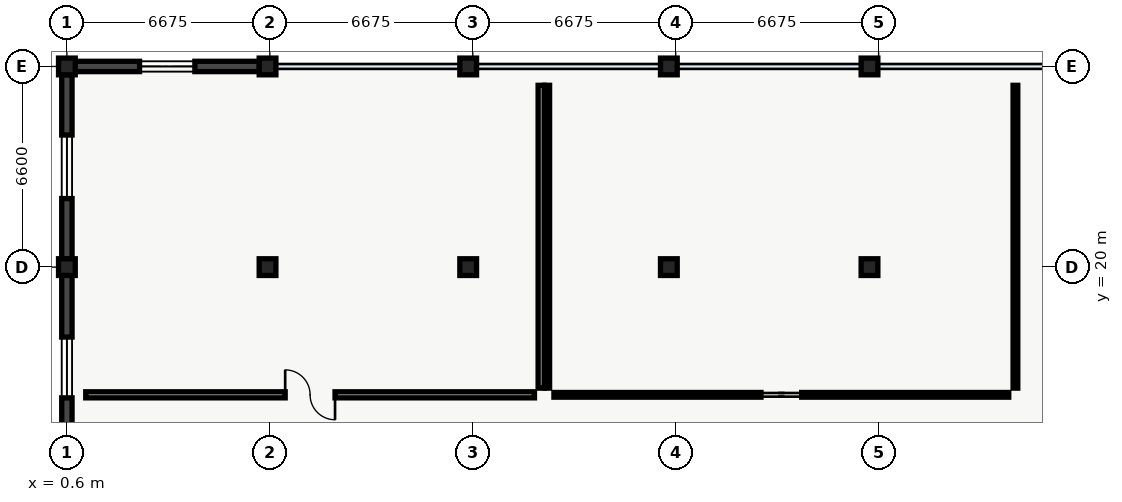
"""IFC4 building model, lengths in metres.
Left out: names, types, materials, properties, quantities, classifications, styles, units other than length and angle.
Written with IfcOpenShell. Run it as: python <this file> out.ifc"""

import sys

from ifc_helpers import new_model, si_unit, direction, frame, frame_2d, origin, origin_2d, place, context, subcontext, project, spatial, polyline, rectangle, outline, extrude, element, fill, save


model = new_model("IFC4")
c1 = context("Model", 3, precision=1e-05, world=origin(), true_north=direction((0.0, 1.0)))
c2 = subcontext(c1, "Body", "Model", "MODEL_VIEW")
j1 = project(units=[si_unit("LENGTHUNIT", "METRE"), si_unit("PLANEANGLEUNIT", "RADIAN")], contexts=[c1])
p1 = place(None, origin())
s1 = spatial("IfcSite", under=j1, at=p1, CompositionType="ELEMENT")
p2 = place(p1, origin())
s2 = spatial("IfcBuilding", under=s1, at=p2, CompositionType="ELEMENT")
p3 = place(p2, frame((0.0, 0.0, 18.6)))
s3 = spatial("IfcBuildingStorey", under=s2, at=p3, CompositionType="ELEMENT", Elevation=18.6)
p4 = place(p3, frame((0.6, 20.0, 0.0), z_axis=(0.0, 0.0, 1.0), x_axis=(1.0, 0.0, 0.0)))
e1 = element("IfcColumn", 1, at=p4, inside=s3, PredefinedType="COLUMN", context=c2, shape_type="SweptSolid", body=[
    extrude(rectangle(XDim=0.55, YDim=0.55, at=origin_2d()), origin(), (0.0, 0.0, 1.0), 9.105),
])
p5 = place(p3, frame((0.6, 26.6, 0.0), z_axis=(0.0, 0.0, 1.0), x_axis=(1.0, 0.0, 0.0)))
e2 = element("IfcColumn", 2, at=p5, inside=s3, PredefinedType="COLUMN", context=c2, shape_type="SweptSolid", body=[
    extrude(rectangle(XDim=0.55, YDim=0.55, at=origin_2d()), origin(), (0.0, 0.0, 1.0), 10.705),
])
p6 = place(p3, frame((7.2, 20.0, 0.0), z_axis=(0.0, 0.0, 1.0), x_axis=(1.0, 0.0, 0.0)))
e3 = element("IfcColumn", 3, at=p6, inside=s3, PredefinedType="COLUMN", context=c2, shape_type="SweptSolid", body=[
    extrude(rectangle(XDim=0.55, YDim=0.55, at=origin_2d()), origin(), (0.0, 0.0, 1.0), 9.105),
])
p7 = place(p3, frame((7.2, 26.6, 0.0), z_axis=(0.0, 0.0, 1.0), x_axis=(1.0, 0.0, 0.0)))
e4 = element("IfcColumn", 4, at=p7, inside=s3, PredefinedType="COLUMN", context=c2, shape_type="SweptSolid", body=[
    extrude(rectangle(XDim=0.55, YDim=0.55, at=origin_2d()), origin(), (0.0, 0.0, 1.0), 10.705),
])
p8 = place(p3, frame((13.8, 20.0, 0.0), z_axis=(0.0, 0.0, 1.0), x_axis=(1.0, 0.0, 0.0)))
e5 = element("IfcColumn", 5, at=p8, inside=s3, PredefinedType="COLUMN", context=c2, shape_type="SweptSolid", body=[
    extrude(rectangle(XDim=0.55, YDim=0.55, at=origin_2d()), origin(), (0.0, 0.0, 1.0), 9.105),
])
p9 = place(p3, frame((13.8, 26.6, 0.0), z_axis=(0.0, 0.0, 1.0), x_axis=(1.0, 0.0, 0.0)))
e6 = element("IfcColumn", 6, at=p9, inside=s3, PredefinedType="COLUMN", context=c2, shape_type="SweptSolid", body=[
    extrude(rectangle(XDim=0.55, YDim=0.55, at=origin_2d()), origin(), (0.0, 0.0, 1.0), 10.705),
])
p10 = place(p3, frame((20.4, 20.0, 0.0), z_axis=(0.0, 0.0, 1.0), x_axis=(1.0, 0.0, 0.0)))
e7 = element("IfcColumn", 7, at=p10, inside=s3, PredefinedType="COLUMN", context=c2, shape_type="SweptSolid", body=[
    extrude(rectangle(XDim=0.55, YDim=0.55, at=origin_2d()), origin(), (0.0, 0.0, 1.0), 9.105),
])
p11 = place(p3, frame((20.4, 26.6, 0.0), z_axis=(0.0, 0.0, 1.0), x_axis=(1.0, 0.0, 0.0)))
e8 = element("IfcColumn", 8, at=p11, inside=s3, PredefinedType="COLUMN", context=c2, shape_type="SweptSolid", body=[
    extrude(rectangle(XDim=0.55, YDim=0.55, at=origin_2d()), origin(), (0.0, 0.0, 1.0), 10.705),
])
p12 = place(p3, frame((27.0, 20.0, 0.0), z_axis=(0.0, 0.0, 1.0), x_axis=(1.0, 0.0, 0.0)))
e9 = element("IfcColumn", 9, at=p12, inside=s3, PredefinedType="COLUMN", context=c2, shape_type="SweptSolid", body=[
    extrude(rectangle(XDim=0.55, YDim=0.55, at=origin_2d()), origin(), (0.0, 0.0, 1.0), 9.105),
])
p13 = place(p3, frame((27.0, 26.6, 0.0), z_axis=(0.0, 0.0, 1.0), x_axis=(1.0, 0.0, 0.0)))
e10 = element("IfcColumn", 10, at=p13, inside=s3, PredefinedType="COLUMN", context=c2, shape_type="SweptSolid", body=[
    extrude(rectangle(XDim=0.55, YDim=0.55, at=origin_2d()), origin(), (0.0, 0.0, 1.0), 10.705),
])
p14 = place(p3, frame((0.6, 13.67, 0.0), z_axis=(0.0, 0.0, 1.0), x_axis=(0.0, 1.0, 0.0)))
e11 = element("IfcWall", 11, at=p14, inside=s3, PredefinedType="SOLIDWALL", context=c2, shape_type="SweptSolid", body=[
    extrude(outline(polyline([(0.0, 0.0), (6.06, 0.0), (6.06, 8.984), (0.0, 7.515), (0.0, 0.0)])), frame((0.0, 0.17, 0.0), z_axis=(0.0, -1.0, 0.0), x_axis=(1.0, 0.0, 0.0)), (0.0, 0.0, 1.0), 0.34),
])
p15 = place(p14, frame((2.03, 0.0, 0.95)))
e12 = element("IfcOpeningElement", 12, at=p15, cuts=e11, PredefinedType="OPENING", context=c2, shape_type="SweptSolid", body=[
    extrude(rectangle(XDim=2.0, YDim=1.42, at=frame_2d((1.0, 0.71))), frame((0.0, 0.17, 0.0), z_axis=(0.0, -1.0, 0.0), x_axis=(1.0, 0.0, 0.0)), (0.0, 0.0, 1.0), 0.34),
])
p16 = place(p3, frame((0.6, 20.27, 0.0), z_axis=(0.0, 0.0, 1.0), x_axis=(0.0, 1.0, 0.0)))
e13 = element("IfcWall", 13, at=p16, inside=s3, PredefinedType="SOLIDWALL", context=c2, shape_type="SweptSolid", body=[
    extrude(outline(polyline([(0.0, 0.0), (6.06, 0.0), (6.06, 10.584), (0.0, 9.115), (0.0, 0.0)])), frame((0.0, 0.17, 0.0), z_axis=(0.0, -1.0, 0.0), x_axis=(1.0, 0.0, 0.0)), (0.0, 0.0, 1.0), 0.34),
])
p17 = place(p16, frame((1.985, 0.0, 0.95)))
e14 = element("IfcOpeningElement", 14, at=p17, cuts=e13, PredefinedType="OPENING", context=c2, shape_type="SweptSolid", body=[
    extrude(rectangle(XDim=2.09, YDim=1.44, at=frame_2d((1.045, 0.72))), frame((0.0, 0.17, 0.0), z_axis=(0.0, -1.0, 0.0), x_axis=(1.0, 0.0, 0.0)), (0.0, 0.0, 1.0), 0.34),
])
p18 = place(p3, frame((0.87, 26.6, 0.0), z_axis=(0.0, 0.0, 1.0), x_axis=(1.0, 0.0, 0.0)))
e15 = element("IfcWall", 15, at=p18, inside=s3, PredefinedType="SOLIDWALL", context=c2, shape_type="SweptSolid", body=[
    extrude(rectangle(XDim=6.06, YDim=0.34, at=frame_2d((3.03, 0.0))), origin(), (0.0, 0.0, 1.0), 10.08),
])
p19 = place(p18, frame((2.12, 0.0, 0.95)))
e16 = element("IfcOpeningElement", 16, at=p19, cuts=e15, PredefinedType="OPENING", context=c2, shape_type="SweptSolid", body=[
    extrude(rectangle(XDim=1.82, YDim=1.38, at=frame_2d((0.91, 0.69))), frame((0.0, 0.17, 0.0), z_axis=(0.0, -1.0, 0.0), x_axis=(1.0, 0.0, 0.0)), (0.0, 0.0, 1.0), 0.34),
])
p20 = place(p3, frame((1.22, 15.8, 0.0), z_axis=(0.0, 0.0, 1.0), x_axis=(1.0, 0.0, 0.0)))
e17 = element("IfcWall", 17, at=p20, inside=s3, PredefinedType="SOLIDWALL", context=c2, shape_type="SweptSolid", body=[
    extrude(rectangle(XDim=14.76, YDim=0.2, at=frame_2d((7.38, 0.0))), origin(), (0.0, 0.0, 1.0), 3.95),
])
p21 = place(p20, frame((6.56, 0.0, 0.0)))
e18 = element("IfcOpeningElement", 18, at=p21, cuts=e17, PredefinedType="OPENING", context=c2, shape_type="SweptSolid", body=[
    extrude(rectangle(XDim=1.64, YDim=2.2, at=frame_2d((0.82, 1.1))), frame((0.0, 0.1, 0.0), z_axis=(0.0, -1.0, 0.0), x_axis=(1.0, 0.0, 0.0)), (0.0, 0.0, 1.0), 0.2),
])
p22 = place(p3, frame((16.2, 16.02, 0.0), z_axis=(0.0, 0.0, 1.0), x_axis=(0.0, 1.0, 0.0)))
e19 = element("IfcWall", 19, at=p22, inside=s3, PredefinedType="SOLIDWALL", context=c2, shape_type="SweptSolid", body=[
    extrude(rectangle(XDim=9.96, YDim=0.2, at=frame_2d((4.98, 0.0))), origin(), (0.0, 0.0, 1.0), 3.95),
])
p23 = place(p3, frame((16.62, 15.8, 0.0), z_axis=(0.0, 0.0, 1.0), x_axis=(1.0, 0.0, 0.0)))
e20 = element("IfcWall", 20, at=p23, inside=s3, PredefinedType="PARTITIONING", context=c2, shape_type="SweptSolid", body=[
    extrude(rectangle(XDim=14.96, YDim=0.155, at=frame_2d((7.48, 0.0))), origin(), (0.0, 0.0, 1.0), 3.95),
])
p24 = place(p23, frame((6.81, 0.0, 0.0)))
e21 = element("IfcOpeningElement", 21, at=p24, cuts=e20, PredefinedType="OPENING", context=c2, shape_type="SweptSolid", body=[
    extrude(rectangle(XDim=1.34, YDim=2.2, at=frame_2d((0.67, 1.1))), frame((0.0, 0.078, 0.0), z_axis=(0.0, -1.0, 0.0), x_axis=(1.0, 0.0, 0.0)), (0.0, 0.0, 1.0), 0.155),
])
for number, where, z_axis, x_axis in (
    (22, (31.8, 16.02, 0.0), (0.0, 0.0, 1.0), (0.0, 1.0, 0.0)),
    (23, (16.4, 25.98, 0.0), (0.0, 0.0, 1.0), (0.0, -1.0, 0.0)),
):
    element("IfcWall", number, at=place(p3, frame(where, z_axis=z_axis, x_axis=x_axis)), inside=s3, PredefinedType="PARTITIONING", context=c2, shape_type="SweptSolid", body=[
        extrude(rectangle(XDim=9.96, YDim=0.155, at=frame_2d((4.98, 0.0))), origin(), (0.0, 0.0, 1.0), 3.95),
    ])
p25 = place(p15, origin())
e24 = element("IfcWindow", 24, at=p25, inside=s3, PartitioningType="SINGLE_PANEL", PredefinedType="WINDOW", context=c2, shape_type="SweptSolid", body=[
    extrude(rectangle(XDim=2.0, YDim=1.42, at=frame_2d((1.0, 0.71))), frame((0.0, 0.03, 0.0), z_axis=(0.0, -1.0, 0.0), x_axis=(1.0, 0.0, 0.0)), (0.0, 0.0, 1.0), 0.06),
])
fill(e12, e24)
p26 = place(p17, origin())
e25 = element("IfcWindow", 25, at=p26, inside=s3, PartitioningType="SINGLE_PANEL", PredefinedType="WINDOW", context=c2, shape_type="SweptSolid", body=[
    extrude(rectangle(XDim=2.09, YDim=1.44, at=frame_2d((1.045, 0.72))), frame((0.0, 0.03, 0.0), z_axis=(0.0, -1.0, 0.0), x_axis=(1.0, 0.0, 0.0)), (0.0, 0.0, 1.0), 0.06),
])
fill(e14, e25)
p27 = place(p19, origin())
e26 = element("IfcWindow", 26, at=p27, inside=s3, PartitioningType="SINGLE_PANEL", PredefinedType="WINDOW", context=c2, shape_type="SweptSolid", body=[
    extrude(rectangle(XDim=1.82, YDim=1.38, at=frame_2d((0.91, 0.69))), frame((0.0, 0.03, 0.0), z_axis=(0.0, -1.0, 0.0), x_axis=(1.0, 0.0, 0.0)), (0.0, 0.0, 1.0), 0.06),
])
fill(e16, e26)
p28 = place(p21, origin())
e27 = element("IfcDoor", 27, at=p28, inside=s3, OperationType="DOUBLE_DOOR_SINGLE_SWING", PredefinedType="DOOR", context=c2, shape_type="SweptSolid", body=[
    extrude(rectangle(XDim=1.64, YDim=2.2, at=frame_2d((0.82, 1.1))), frame((0.0, 0.025, 0.0), z_axis=(0.0, -1.0, 0.0), x_axis=(1.0, 0.0, 0.0)), (0.0, 0.0, 1.0), 0.05),
])
fill(e18, e27)
p29 = place(p24, origin())
e28 = element("IfcDoor", 28, at=p29, inside=s3, OperationType="SLIDING_TO_RIGHT", PredefinedType="DOOR", context=c2, shape_type="SweptSolid", body=[
    extrude(rectangle(XDim=1.34, YDim=2.2, at=frame_2d((0.67, 1.1))), frame((0.0, 0.025, 0.0), z_axis=(0.0, -1.0, 0.0), x_axis=(1.0, 0.0, 0.0)), (0.0, 0.0, 1.0), 0.05),
])
fill(e21, e28)
save(model, sys.argv[1])
